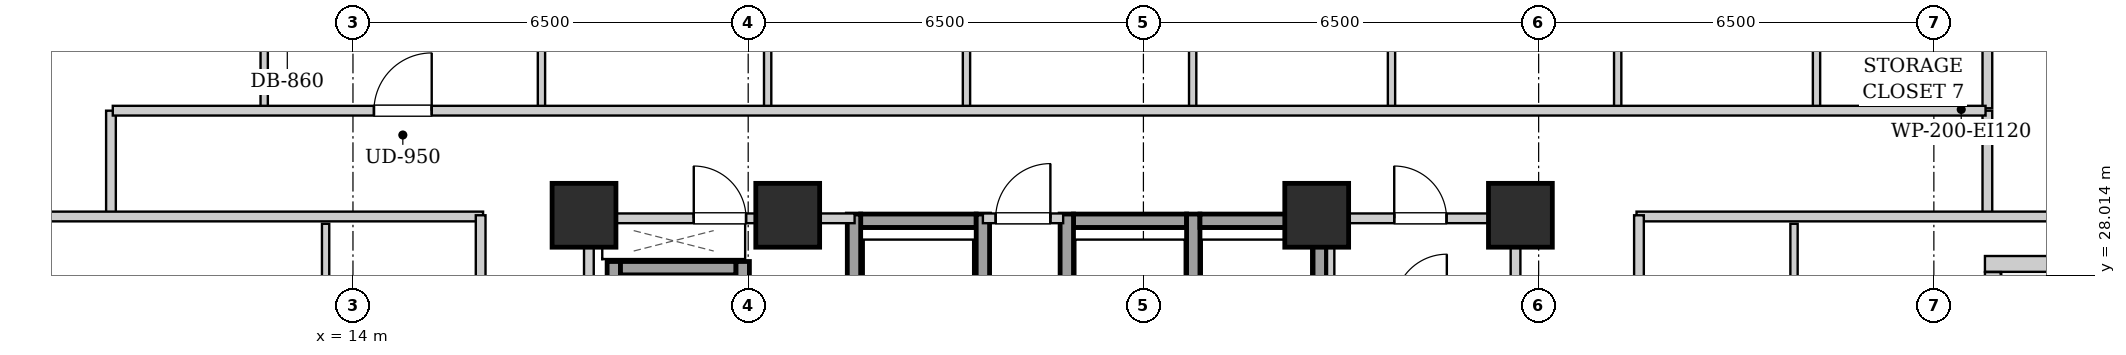
"""IFC4 building model, lengths in metres.
Left out: names, types, materials, properties, quantities, classifications, styles, units other than length and angle.
Written with IfcOpenShell. Run it as: python <this file> out.ifc"""

import sys

from ifc_helpers import new_model, si_unit, direction, frame, frame_2d, origin, origin_2d, place, context, subcontext, project, spatial, rectangle, extrude, element, fill, save


model = new_model("IFC4")
c1 = context("Model", 3, precision=1e-05, world=origin(), true_north=direction((0.0, 1.0)))
c2 = subcontext(c1, "Body", "Model", "MODEL_VIEW")
j1 = project(units=[si_unit("LENGTHUNIT", "METRE"), si_unit("PLANEANGLEUNIT", "RADIAN")], contexts=[c1])
p1 = place(None, origin())
s1 = spatial("IfcSite", under=j1, at=p1, CompositionType="ELEMENT")
p2 = place(p1, origin())
s2 = spatial("IfcBuilding", under=s1, at=p2, CompositionType="ELEMENT")
p3 = place(p2, frame((0.0, 0.0, 100.7)))
s3 = spatial("IfcBuildingStorey", under=s2, at=p3, CompositionType="ELEMENT", Elevation=100.7)
for number, where, z_axis, x_axis in (
    (1, (17.8, 29.0, 0.0), (0.0, 0.0, 1.0), (1.0, 0.0, 0.0)),
    (2, (21.15, 29.0, 0.0), (0.0, 0.0, 1.0), (1.0, 0.0, 0.0)),
    (3, (29.85, 29.0, 0.0), (0.0, 0.0, 1.0), (1.0, 0.0, 0.0)),
    (4, (33.2, 29.0, 0.0), (0.0, 0.0, 1.0), (1.0, 0.0, 0.0)),
):
    element("IfcColumn", number, at=place(p3, frame(where, z_axis=z_axis, x_axis=x_axis)), inside=s3, PredefinedType="COLUMN", context=c2, shape_type="SweptSolid", body=[
        extrude(rectangle(XDim=1.05, YDim=1.05, at=origin_2d()), origin(), (0.0, 0.0, 1.0), 3.2),
    ])
p4 = place(p3, frame((43.24, 28.2, 0.0), z_axis=(0.0, 0.0, 1.0), x_axis=(-1.0, 0.0, 0.0)))
e5 = element("IfcWall", 5, at=p4, inside=s3, PredefinedType="SOLIDWALL", context=c2, shape_type="SweptSolid", body=[
    extrude(rectangle(XDim=2.4, YDim=0.26, at=frame_2d((1.2, 0.0))), origin(), (0.0, 0.0, 1.0), 2.94),
])
p5 = place(p3, frame((40.97, 28.066, 0.0), z_axis=(0.0, 0.0, 1.0), x_axis=(0.0, -1.0, 0.0)))
e6 = element("IfcWall", 6, at=p5, inside=s3, PredefinedType="SOLIDWALL", context=c2, shape_type="SweptSolid", body=[
    extrude(rectangle(XDim=3.332, YDim=0.26, at=frame_2d((1.666, 0.0))), origin(), (0.0, 0.0, 1.0), 2.94),
])
p6 = place(p5, frame((1.116, 0.0, 0.0)))
e7 = element("IfcOpeningElement", 7, at=p6, cuts=e6, PredefinedType="OPENING", context=c2, shape_type="SweptSolid", body=[
    extrude(rectangle(XDim=1.1, YDim=2.0, at=frame_2d((0.55, 1.0))), frame((0.0, 0.14, 0.0), z_axis=(0.0, -1.0, 0.0), x_axis=(1.0, 0.0, 0.0)), (0.0, 0.0, 1.0), 0.28),
])
p7 = place(p5, frame((0.276, 0.0, 0.55)))
e8 = element("IfcOpeningElement", 8, at=p7, cuts=e6, PredefinedType="OPENING", context=c2, shape_type="SweptSolid", body=[
    extrude(rectangle(XDim=0.68, YDim=1.2, at=frame_2d((0.34, 0.6))), frame((0.0, 0.14, 0.0), z_axis=(0.0, -1.0, 0.0), x_axis=(1.0, 0.0, 0.0)), (0.0, 0.0, 1.0), 0.28),
])
p8 = place(p3, frame((22.35, 28.91, 0.0), z_axis=(0.0, 0.0, 1.0), x_axis=(1.0, 0.0, 0.0)))
e9 = element("IfcWall", 9, at=p8, inside=s3, PredefinedType="SHEAR", context=c2, shape_type="SweptSolid", body=[
    extrude(rectangle(XDim=1.9, YDim=0.22, at=frame_2d((0.95, 0.0))), origin(), (0.0, 0.0, 1.0), 2.94),
])
for number, where, z_axis, x_axis in (
    (10, (22.24, 26.58, 0.0), (0.0, 0.0, 1.0), (0.0, 1.0, 0.0)),
    (11, (24.36, 26.58, 0.0), (0.0, 0.0, 1.0), (0.0, 1.0, 0.0)),
):
    element("IfcWall", number, at=place(p3, frame(where, z_axis=z_axis, x_axis=x_axis)), inside=s3, PredefinedType="SHEAR", context=c2, shape_type="SweptSolid", body=[
        extrude(rectangle(XDim=2.44, YDim=0.22, at=frame_2d((1.22, 0.0))), origin(), (0.0, 0.0, 1.0), 2.94),
    ])
p9 = place(p3, frame((25.85, 28.91, 0.0), z_axis=(0.0, 0.0, 1.0), x_axis=(1.0, 0.0, 0.0)))
e12 = element("IfcWall", 12, at=p9, inside=s3, PredefinedType="SHEAR", context=c2, shape_type="SweptSolid", body=[
    extrude(rectangle(XDim=1.86, YDim=0.22, at=frame_2d((0.93, 0.0))), origin(), (0.0, 0.0, 1.0), 2.94),
])
for number, where, z_axis, x_axis in (
    (13, (25.74, 26.58, 0.0), (0.0, 0.0, 1.0), (0.0, 1.0, 0.0)),
    (14, (27.82, 26.58, 0.0), (0.0, 0.0, 1.0), (0.0, 1.0, 0.0)),
):
    element("IfcWall", number, at=place(p3, frame(where, z_axis=z_axis, x_axis=x_axis)), inside=s3, PredefinedType="SHEAR", context=c2, shape_type="SweptSolid", body=[
        extrude(rectangle(XDim=2.44, YDim=0.22, at=frame_2d((1.22, 0.0))), origin(), (0.0, 0.0, 1.0), 2.94),
    ])
p10 = place(p3, frame((27.93, 28.91, 0.0), z_axis=(0.0, 0.0, 1.0), x_axis=(1.0, 0.0, 0.0)))
e15 = element("IfcWall", 15, at=p10, inside=s3, PredefinedType="SHEAR", context=c2, shape_type="SweptSolid", body=[
    extrude(rectangle(XDim=1.86, YDim=0.22, at=frame_2d((0.93, 0.0))), origin(), (0.0, 0.0, 1.0), 2.94),
])
p11 = place(p3, frame((29.9, 26.58, 0.0), z_axis=(0.0, 0.0, 1.0), x_axis=(0.0, 1.0, 0.0)))
e16 = element("IfcWall", 16, at=p11, inside=s3, PredefinedType="SHEAR", context=c2, shape_type="SweptSolid", body=[
    extrude(rectangle(XDim=2.44, YDim=0.22, at=frame_2d((1.22, 0.0))), origin(), (0.0, 0.0, 1.0), 2.94),
])
p12 = place(p3, frame((18.29, 24.1, 0.0), z_axis=(0.0, 0.0, 1.0), x_axis=(0.0, 1.0, 0.0)))
e17 = element("IfcWall", 17, at=p12, inside=s3, PredefinedType="SHEAR", context=c2, shape_type="SweptSolid", body=[
    extrude(rectangle(XDim=4.14, YDim=0.22, at=frame_2d((2.07, 0.0))), origin(), (0.0, 0.0, 1.0), 2.94),
])
p13 = place(p3, frame((18.4, 28.13, 0.0), z_axis=(0.0, 0.0, 1.0), x_axis=(1.0, 0.0, 0.0)))
e18 = element("IfcWall", 18, at=p13, inside=s3, PredefinedType="SHEAR", context=c2, shape_type="SweptSolid", body=[
    extrude(rectangle(XDim=1.9, YDim=0.22, at=frame_2d((0.95, 0.0))), origin(), (0.0, 0.0, 1.0), 2.94),
])
p14 = place(p3, frame((20.41, 26.06, 0.0), z_axis=(0.0, 0.0, 1.0), x_axis=(0.0, 1.0, 0.0)))
e19 = element("IfcWall", 19, at=p14, inside=s3, PredefinedType="SHEAR", context=c2, shape_type="SweptSolid", body=[
    extrude(rectangle(XDim=2.18, YDim=0.22, at=frame_2d((1.09, 0.0))), origin(), (0.0, 0.0, 1.0), 2.94),
])
for number, where, z_axis, x_axis in (
    (20, (17.88, 24.12, 0.0), (0.0, 0.0, 1.0), (0.0, 1.0, 0.0)),
    (21, (33.12, 24.12, 0.0), (0.0, 0.0, 1.0), (0.0, 1.0, 0.0)),
):
    element("IfcWall", number, at=place(p3, frame(where, z_axis=z_axis, x_axis=x_axis)), inside=s3, PredefinedType="PARTITIONING", context=c2, shape_type="SweptSolid", body=[
        extrude(rectangle(XDim=4.76, YDim=0.16, at=frame_2d((2.38, 0.0))), origin(), (0.0, 0.0, 1.0), 2.94),
    ])
p15 = place(p3, frame((24.36, 28.95, 0.0), z_axis=(0.0, 0.0, 1.0), x_axis=(1.0, 0.0, 0.0)))
e22 = element("IfcWall", 22, at=p15, inside=s3, PredefinedType="PARTITIONING", context=c2, shape_type="SweptSolid", body=[
    extrude(rectangle(XDim=1.32, YDim=0.16, at=frame_2d((0.66, 0.0))), origin(), (0.0, 0.0, 1.0), 2.313),
])
p16 = place(p15, frame((0.21, 0.0, 0.0)))
e23 = element("IfcOpeningElement", 23, at=p16, cuts=e22, PredefinedType="OPENING", context=c2, shape_type="SweptSolid", body=[
    extrude(rectangle(XDim=0.9, YDim=2.05, at=frame_2d((0.45, 1.025))), frame((0.0, 0.09, 0.0), z_axis=(0.0, -1.0, 0.0), x_axis=(1.0, 0.0, 0.0)), (0.0, 0.0, 1.0), 0.18),
])
p17 = place(p3, frame((17.96, 28.95, 0.0), z_axis=(0.0, 0.0, 1.0), x_axis=(1.0, 0.0, 0.0)))
e24 = element("IfcWall", 24, at=p17, inside=s3, PredefinedType="PARTITIONING", context=c2, shape_type="SweptSolid", body=[
    extrude(rectangle(XDim=4.29, YDim=0.16, at=frame_2d((2.145, 0.0))), origin(), (0.0, 0.0, 1.0), 2.313),
])
p18 = place(p17, frame((1.645, 0.0, 0.0)))
e25 = element("IfcOpeningElement", 25, at=p18, cuts=e24, PredefinedType="OPENING", context=c2, shape_type="SweptSolid", body=[
    extrude(rectangle(XDim=0.86, YDim=2.05, at=frame_2d((0.43, 1.025))), frame((0.0, 0.09, 0.0), z_axis=(0.0, -1.0, 0.0), x_axis=(1.0, 0.0, 0.0)), (0.0, 0.0, 1.0), 0.18),
])
p19 = place(p3, frame((30.08, 26.18, 0.0), z_axis=(0.0, 0.0, 1.0), x_axis=(0.0, 1.0, 0.0)))
e26 = element("IfcWall", 26, at=p19, inside=s3, PredefinedType="PARTITIONING", context=c2, shape_type="SweptSolid", body=[
    extrude(rectangle(XDim=2.68, YDim=0.12, at=frame_2d((1.34, 0.0))), origin(), (0.0, 0.0, 1.0), 2.94),
])
p20 = place(p3, frame((30.08, 28.95, 0.0), z_axis=(0.0, 0.0, 1.0), x_axis=(1.0, 0.0, 0.0)))
e27 = element("IfcWall", 27, at=p20, inside=s3, PredefinedType="PARTITIONING", context=c2, shape_type="SweptSolid", body=[
    extrude(rectangle(XDim=2.96, YDim=0.16, at=frame_2d((1.48, 0.0))), origin(), (0.0, 0.0, 1.0), 2.94),
])
p21 = place(p20, frame((1.045, 0.0, 0.0)))
e28 = element("IfcOpeningElement", 28, at=p21, cuts=e27, PredefinedType="OPENING", context=c2, shape_type="SweptSolid", body=[
    extrude(rectangle(XDim=0.86, YDim=2.05, at=frame_2d((0.43, 1.025))), frame((0.0, 0.09, 0.0), z_axis=(0.0, -1.0, 0.0), x_axis=(1.0, 0.0, 0.0)), (0.0, 0.0, 1.0), 0.18),
])
for number, where, z_axis, x_axis in (
    (29, (10.02, 28.98, 0.0), (0.0, 0.0, 1.0), (0.0, 1.0, 0.0)),
    (30, (40.88, 28.98, 0.0), (0.0, 0.0, 1.0), (0.0, 1.0, 0.0)),
):
    element("IfcWall", number, at=place(p3, frame(where, z_axis=z_axis, x_axis=x_axis)), inside=s3, PredefinedType="PARTITIONING", context=c2, shape_type="SweptSolid", body=[
        extrude(rectangle(XDim=1.74, YDim=0.16, at=frame_2d((0.87, 0.0))), origin(), (0.0, 0.0, 1.0), 2.94),
    ])
p22 = place(p3, frame((7.78, 28.98, 0.0), z_axis=(0.0, 0.0, 1.0), x_axis=(1.0, 0.0, 0.0)))
e31 = element("IfcWall", 31, at=p22, inside=s3, PredefinedType="PARTITIONING", context=c2, shape_type="SweptSolid", body=[
    extrude(rectangle(XDim=8.36, YDim=0.16, at=frame_2d((4.18, 0.0))), origin(), (0.0, 0.0, 1.0), 2.313),
])
p23 = place(p3, frame((35.11, 28.98, 0.0), z_axis=(0.0, 0.0, 1.0), x_axis=(1.0, 0.0, 0.0)))
e32 = element("IfcWall", 32, at=p23, inside=s3, PredefinedType="PARTITIONING", context=c2, shape_type="SweptSolid", body=[
    extrude(rectangle(XDim=8.01, YDim=0.16, at=frame_2d((4.005, 0.0))), origin(), (0.0, 0.0, 1.0), 2.313),
])
p24 = place(p3, frame((40.88, 30.76, 0.0), z_axis=(0.0, 0.0, 1.0), x_axis=(0.0, 1.0, 0.0)))
e33 = element("IfcWall", 33, at=p24, inside=s3, PredefinedType="PARTITIONING", context=c2, shape_type="SweptSolid", body=[
    extrude(rectangle(XDim=2.91, YDim=0.16, at=frame_2d((1.455, 0.0))), origin(), (0.0, 0.0, 1.0), 2.94),
])
p25 = place(p3, frame((12.54, 30.76, 0.0), z_axis=(0.0, 0.0, 1.0), x_axis=(0.0, 1.0, 0.0)))
e34 = element("IfcWall", 34, at=p25, inside=s3, PredefinedType="PARTITIONING", context=c2, shape_type="SweptSolid", body=[
    extrude(rectangle(XDim=2.85, YDim=0.12, at=frame_2d((1.425, 0.0))), origin(), (0.0, 0.0, 1.0), 2.94),
])
p26 = place(p25, frame((0.995, 0.0, 0.0)))
e35 = element("IfcOpeningElement", 35, at=p26, cuts=e34, PredefinedType="OPENING", context=c2, shape_type="SweptSolid", body=[
    extrude(rectangle(XDim=0.86, YDim=2.05, at=frame_2d((0.43, 1.025))), frame((0.0, 0.07, 0.0), z_axis=(0.0, -1.0, 0.0), x_axis=(1.0, 0.0, 0.0)), (0.0, 0.0, 1.0), 0.14),
])
p27 = place(p3, frame((17.1, 30.76, 0.0), z_axis=(0.0, 0.0, 1.0), x_axis=(0.0, 1.0, 0.0)))
e36 = element("IfcWall", 36, at=p27, inside=s3, PredefinedType="PARTITIONING", context=c2, shape_type="SweptSolid", body=[
    extrude(rectangle(XDim=2.85, YDim=0.12, at=frame_2d((1.425, 0.0))), origin(), (0.0, 0.0, 1.0), 2.94),
])
p28 = place(p27, frame((0.975, 0.0, 0.0)))
e37 = element("IfcOpeningElement", 37, at=p28, cuts=e36, PredefinedType="OPENING", context=c2, shape_type="SweptSolid", body=[
    extrude(rectangle(XDim=0.9, YDim=2.05, at=frame_2d((0.45, 1.025))), frame((0.0, 0.07, 0.0), z_axis=(0.0, -1.0, 0.0), x_axis=(1.0, 0.0, 0.0)), (0.0, 0.0, 1.0), 0.14),
])
p29 = place(p3, frame((20.82, 30.76, 0.0), z_axis=(0.0, 0.0, 1.0), x_axis=(0.0, 1.0, 0.0)))
e38 = element("IfcWall", 38, at=p29, inside=s3, PredefinedType="PARTITIONING", context=c2, shape_type="SweptSolid", body=[
    extrude(rectangle(XDim=2.85, YDim=0.12, at=frame_2d((1.425, 0.0))), origin(), (0.0, 0.0, 1.0), 2.94),
])
p30 = place(p29, frame((0.975, 0.0, 0.0)))
e39 = element("IfcOpeningElement", 39, at=p30, cuts=e38, PredefinedType="OPENING", context=c2, shape_type="SweptSolid", body=[
    extrude(rectangle(XDim=0.9, YDim=2.05, at=frame_2d((0.45, 1.025))), frame((0.0, 0.07, 0.0), z_axis=(0.0, -1.0, 0.0), x_axis=(1.0, 0.0, 0.0)), (0.0, 0.0, 1.0), 0.14),
])
p31 = place(p3, frame((24.09, 30.76, 0.0), z_axis=(0.0, 0.0, 1.0), x_axis=(0.0, 1.0, 0.0)))
e40 = element("IfcWall", 40, at=p31, inside=s3, PredefinedType="PARTITIONING", context=c2, shape_type="SweptSolid", body=[
    extrude(rectangle(XDim=2.85, YDim=0.12, at=frame_2d((1.425, 0.0))), origin(), (0.0, 0.0, 1.0), 2.94),
])
p32 = place(p31, frame((0.975, 0.0, 0.0)))
e41 = element("IfcOpeningElement", 41, at=p32, cuts=e40, PredefinedType="OPENING", context=c2, shape_type="SweptSolid", body=[
    extrude(rectangle(XDim=0.9, YDim=2.05, at=frame_2d((0.45, 1.025))), frame((0.0, 0.07, 0.0), z_axis=(0.0, -1.0, 0.0), x_axis=(1.0, 0.0, 0.0)), (0.0, 0.0, 1.0), 0.14),
])
p33 = place(p3, frame((27.81, 30.76, 0.0), z_axis=(0.0, 0.0, 1.0), x_axis=(0.0, 1.0, 0.0)))
e42 = element("IfcWall", 42, at=p33, inside=s3, PredefinedType="PARTITIONING", context=c2, shape_type="SweptSolid", body=[
    extrude(rectangle(XDim=2.85, YDim=0.12, at=frame_2d((1.425, 0.0))), origin(), (0.0, 0.0, 1.0), 2.94),
])
p34 = place(p33, frame((0.975, 0.0, 0.0)))
e43 = element("IfcOpeningElement", 43, at=p34, cuts=e42, PredefinedType="OPENING", context=c2, shape_type="SweptSolid", body=[
    extrude(rectangle(XDim=0.9, YDim=2.05, at=frame_2d((0.45, 1.025))), frame((0.0, 0.07, 0.0), z_axis=(0.0, -1.0, 0.0), x_axis=(1.0, 0.0, 0.0)), (0.0, 0.0, 1.0), 0.14),
])
p35 = place(p3, frame((31.08, 30.76, 0.0), z_axis=(0.0, 0.0, 1.0), x_axis=(0.0, 1.0, 0.0)))
e44 = element("IfcWall", 44, at=p35, inside=s3, PredefinedType="PARTITIONING", context=c2, shape_type="SweptSolid", body=[
    extrude(rectangle(XDim=2.85, YDim=0.12, at=frame_2d((1.425, 0.0))), origin(), (0.0, 0.0, 1.0), 2.94),
])
p36 = place(p35, frame((0.975, 0.0, 0.0)))
e45 = element("IfcOpeningElement", 45, at=p36, cuts=e44, PredefinedType="OPENING", context=c2, shape_type="SweptSolid", body=[
    extrude(rectangle(XDim=0.9, YDim=2.05, at=frame_2d((0.45, 1.025))), frame((0.0, 0.07, 0.0), z_axis=(0.0, -1.0, 0.0), x_axis=(1.0, 0.0, 0.0)), (0.0, 0.0, 1.0), 0.14),
])
p37 = place(p3, frame((34.8, 30.76, 0.0), z_axis=(0.0, 0.0, 1.0), x_axis=(0.0, 1.0, 0.0)))
e46 = element("IfcWall", 46, at=p37, inside=s3, PredefinedType="PARTITIONING", context=c2, shape_type="SweptSolid", body=[
    extrude(rectangle(XDim=2.85, YDim=0.12, at=frame_2d((1.425, 0.0))), origin(), (0.0, 0.0, 1.0), 2.94),
])
p38 = place(p37, frame((0.975, 0.0, 0.0)))
e47 = element("IfcOpeningElement", 47, at=p38, cuts=e46, PredefinedType="OPENING", context=c2, shape_type="SweptSolid", body=[
    extrude(rectangle(XDim=0.9, YDim=2.05, at=frame_2d((0.45, 1.025))), frame((0.0, 0.07, 0.0), z_axis=(0.0, -1.0, 0.0), x_axis=(1.0, 0.0, 0.0)), (0.0, 0.0, 1.0), 0.14),
])
p39 = place(p3, frame((38.07, 30.76, 0.0), z_axis=(0.0, 0.0, 1.0), x_axis=(0.0, 1.0, 0.0)))
e48 = element("IfcWall", 48, at=p39, inside=s3, PredefinedType="PARTITIONING", context=c2, shape_type="SweptSolid", body=[
    extrude(rectangle(XDim=2.85, YDim=0.12, at=frame_2d((1.425, 0.0))), origin(), (0.0, 0.0, 1.0), 2.94),
])
p40 = place(p39, frame((0.975, 0.0, 0.0)))
e49 = element("IfcOpeningElement", 49, at=p40, cuts=e48, PredefinedType="OPENING", context=c2, shape_type="SweptSolid", body=[
    extrude(rectangle(XDim=0.9, YDim=2.05, at=frame_2d((0.45, 1.025))), frame((0.0, 0.07, 0.0), z_axis=(0.0, -1.0, 0.0), x_axis=(1.0, 0.0, 0.0)), (0.0, 0.0, 1.0), 0.14),
])
p41 = place(p3, frame((13.55, 25.052, 0.0), z_axis=(0.0, 0.0, 1.0), x_axis=(0.0, 1.0, 0.0)))
e50 = element("IfcWall", 50, at=p41, inside=s3, PredefinedType="PARTITIONING", context=c2, shape_type="SweptSolid", body=[
    extrude(rectangle(XDim=3.808, YDim=0.12, at=frame_2d((1.904, 0.0))), origin(), (0.0, 0.0, 1.0), 2.94),
])
p42 = place(p41, frame((1.454, 0.0, 0.0)))
e51 = element("IfcOpeningElement", 51, at=p42, cuts=e50, PredefinedType="OPENING", context=c2, shape_type="SweptSolid", body=[
    extrude(rectangle(XDim=0.9, YDim=2.05, at=frame_2d((0.45, 1.025))), frame((0.0, 0.07, 0.0), z_axis=(0.0, -1.0, 0.0), x_axis=(1.0, 0.0, 0.0)), (0.0, 0.0, 1.0), 0.14),
])
p43 = place(p3, frame((37.7, 24.552, 0.0), z_axis=(0.0, 0.0, 1.0), x_axis=(0.0, 1.0, 0.0)))
e52 = element("IfcWall", 52, at=p43, inside=s3, PredefinedType="PARTITIONING", context=c2, shape_type="SweptSolid", body=[
    extrude(rectangle(XDim=4.308, YDim=0.12, at=frame_2d((2.154, 0.0))), origin(), (0.0, 0.0, 1.0), 2.94),
])
p44 = place(p43, frame((1.704, 0.0, 0.0)))
e53 = element("IfcOpeningElement", 53, at=p44, cuts=e52, PredefinedType="OPENING", context=c2, shape_type="SweptSolid", body=[
    extrude(rectangle(XDim=0.9, YDim=2.05, at=frame_2d((0.45, 1.025))), frame((0.0, 0.07, 0.0), z_axis=(0.0, -1.0, 0.0), x_axis=(1.0, 0.0, 0.0)), (0.0, 0.0, 1.0), 0.14),
])
p45 = place(p3, frame((10.05, 30.72, 0.0), z_axis=(0.0, 0.0, 1.0), x_axis=(1.0, 0.0, 0.0)))
e54 = element("IfcWall", 54, at=p45, inside=s3, PredefinedType="PARTITIONING", context=c2, shape_type="SweptSolid", body=[
    extrude(rectangle(XDim=30.8, YDim=0.16, at=frame_2d((15.4, 0.0))), origin(), (0.0, 0.0, 1.0), 2.94),
])
p46 = place(p45, frame((4.295, 0.0, 0.0)))
e55 = element("IfcOpeningElement", 55, at=p46, cuts=e54, PredefinedType="OPENING", context=c2, shape_type="SweptSolid", body=[
    extrude(rectangle(XDim=0.95, YDim=2.1, at=frame_2d((0.475, 1.05))), frame((0.0, 0.09, 0.0), z_axis=(0.0, -1.0, 0.0), x_axis=(1.0, 0.0, 0.0)), (0.0, 0.0, 1.0), 0.18),
])
p47 = place(p3, frame((16.1, 15.07, 0.0), z_axis=(0.0, 0.0, 1.0), x_axis=(0.0, 1.0, 0.0)))
e56 = element("IfcWall", 56, at=p47, inside=s3, PredefinedType="PARTITIONING", context=c2, shape_type="SweptSolid", body=[
    extrude(rectangle(XDim=13.93, YDim=0.16, at=frame_2d((6.965, 0.0))), origin(), (0.0, 0.0, 1.0), 2.94),
])
p48 = place(p47, frame((4.661, 0.0, 0.0)))
e57 = element("IfcOpeningElement", 57, at=p48, cuts=e56, PredefinedType="OPENING", context=c2, shape_type="SweptSolid", body=[
    extrude(rectangle(XDim=0.95, YDim=2.1, at=frame_2d((0.475, 1.05))), frame((0.0, 0.09, 0.0), z_axis=(0.0, -1.0, 0.0), x_axis=(1.0, 0.0, 0.0)), (0.0, 0.0, 1.0), 0.18),
])
p49 = place(p47, frame((11.411, 0.0, 0.0)))
e58 = element("IfcOpeningElement", 58, at=p49, cuts=e56, PredefinedType="OPENING", context=c2, shape_type="SweptSolid", body=[
    extrude(rectangle(XDim=0.95, YDim=2.1, at=frame_2d((0.475, 1.05))), frame((0.0, 0.09, 0.0), z_axis=(0.0, -1.0, 0.0), x_axis=(1.0, 0.0, 0.0)), (0.0, 0.0, 1.0), 0.18),
])
p50 = place(p3, frame((35.15, 15.07, 0.0), z_axis=(0.0, 0.0, 1.0), x_axis=(0.0, 1.0, 0.0)))
e59 = element("IfcWall", 59, at=p50, inside=s3, PredefinedType="PARTITIONING", context=c2, shape_type="SweptSolid", body=[
    extrude(rectangle(XDim=13.93, YDim=0.16, at=frame_2d((6.965, 0.0))), origin(), (0.0, 0.0, 1.0), 2.94),
])
p51 = place(p50, frame((4.385, 0.0, 0.0)))
e60 = element("IfcOpeningElement", 60, at=p51, cuts=e59, PredefinedType="OPENING", context=c2, shape_type="SweptSolid", body=[
    extrude(rectangle(XDim=0.95, YDim=2.1, at=frame_2d((0.475, 1.05))), frame((0.0, 0.09, 0.0), z_axis=(0.0, -1.0, 0.0), x_axis=(1.0, 0.0, 0.0)), (0.0, 0.0, 1.0), 0.18),
])
p52 = place(p16, origin())
e61 = element("IfcDoor", 61, at=p52, inside=s3, OperationType="SINGLE_SWING_RIGHT", PredefinedType="DOOR", context=c2, shape_type="SweptSolid", body=[
    extrude(rectangle(XDim=0.9, YDim=2.05, at=frame_2d((0.45, 1.025))), frame((0.0, 0.025, 0.0), z_axis=(0.0, -1.0, 0.0), x_axis=(1.0, 0.0, 0.0)), (0.0, 0.0, 1.0), 0.05),
])
fill(e23, e61)
p53 = place(p18, origin())
e62 = element("IfcDoor", 62, at=p53, inside=s3, OperationType="SINGLE_SWING_LEFT", PredefinedType="DOOR", context=c2, shape_type="SweptSolid", body=[
    extrude(rectangle(XDim=0.86, YDim=2.05, at=frame_2d((0.43, 1.025))), frame((0.0, 0.025, 0.0), z_axis=(0.0, -1.0, 0.0), x_axis=(1.0, 0.0, 0.0)), (0.0, 0.0, 1.0), 0.05),
])
fill(e25, e62)
p54 = place(p21, origin())
e63 = element("IfcDoor", 63, at=p54, inside=s3, OperationType="SINGLE_SWING_LEFT", PredefinedType="DOOR", context=c2, shape_type="SweptSolid", body=[
    extrude(rectangle(XDim=0.86, YDim=2.05, at=frame_2d((0.43, 1.025))), frame((0.0, 0.025, 0.0), z_axis=(0.0, -1.0, 0.0), x_axis=(1.0, 0.0, 0.0)), (0.0, 0.0, 1.0), 0.05),
])
fill(e28, e63)
p55 = place(p46, origin())
e64 = element("IfcDoor", 64, at=p55, inside=s3, OperationType="SINGLE_SWING_RIGHT", PredefinedType="DOOR", context=c2, shape_type="SweptSolid", body=[
    extrude(rectangle(XDim=0.95, YDim=2.1, at=frame_2d((0.475, 1.05))), frame((0.0, 0.025, 0.0), z_axis=(0.0, -1.0, 0.0), x_axis=(1.0, 0.0, 0.0)), (0.0, 0.0, 1.0), 0.05),
])
fill(e55, e64)
save(model, sys.argv[1])
